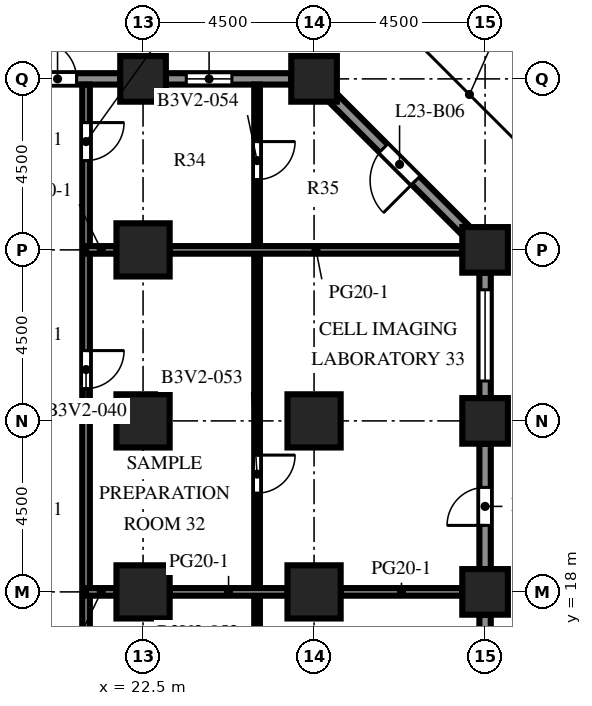
"""IFC4 building model, lengths in metres.
Left out: names, types, materials, properties, quantities, classifications, styles, units other than length and angle.
Written with IfcOpenShell. Run it as: python <this file> out.ifc"""

import sys

from ifc_helpers import new_model, si_unit, direction, frame, frame_2d, origin, origin_2d, place, context, subcontext, project, spatial, rectangle, extrude, element, fill, save


model = new_model("IFC4")
c1 = context("Model", 3, precision=1e-05, world=origin(), true_north=direction((0.0, 1.0)))
c2 = subcontext(c1, "Body", "Model", "MODEL_VIEW")
j1 = project(units=[si_unit("LENGTHUNIT", "METRE"), si_unit("PLANEANGLEUNIT", "RADIAN")], contexts=[c1])
p1 = place(None, origin())
s1 = spatial("IfcSite", under=j1, at=p1, CompositionType="ELEMENT")
p2 = place(p1, origin())
s2 = spatial("IfcBuilding", under=s1, at=p2, CompositionType="ELEMENT")
p3 = place(p2, frame((0.0, 0.0, 102.5)))
s3 = spatial("IfcBuildingStorey", under=s2, at=p3, CompositionType="ELEMENT", Elevation=102.5)
for number, where, z_axis, x_axis in (
    (1, (22.5, 31.5, 0.0), (0.0, 0.0, 1.0), (1.0, 0.0, 0.0)),
    (2, (27.0, 31.5, 0.0), (0.0, 0.0, 1.0), (1.0, 0.0, 0.0)),
    (3, (31.5, 18.0, 0.0), (0.0, 0.0, 1.0), (1.0, 0.0, 0.0)),
    (4, (31.5, 22.5, 0.0), (0.0, 0.0, 1.0), (1.0, 0.0, 0.0)),
    (5, (31.5, 27.0, 0.0), (0.0, 0.0, 1.0), (1.0, 0.0, 0.0)),
):
    element("IfcColumn", number, at=place(p3, frame(where, z_axis=z_axis, x_axis=x_axis)), inside=s3, PredefinedType="COLUMN", context=c2, shape_type="SweptSolid", body=[
        extrude(rectangle(XDim=1.2, YDim=1.2, at=origin_2d()), origin(), (0.0, 0.0, 1.0), 4.1),
    ])
for number, where, z_axis, x_axis in (
    (6, (22.5, 18.0, 0.0), (0.0, 0.0, 1.0), (1.0, 0.0, 0.0)),
    (7, (22.5, 22.5, 0.0), (0.0, 0.0, 1.0), (1.0, 0.0, 0.0)),
    (8, (22.5, 27.0, 0.0), (0.0, 0.0, 1.0), (1.0, 0.0, 0.0)),
    (9, (27.0, 18.0, 0.0), (0.0, 0.0, 1.0), (1.0, 0.0, 0.0)),
    (10, (27.0, 22.5, 0.0), (0.0, 0.0, 1.0), (1.0, 0.0, 0.0)),
):
    element("IfcColumn", number, at=place(p3, frame(where, z_axis=z_axis, x_axis=x_axis)), inside=s3, PredefinedType="COLUMN", context=c2, shape_type="SweptSolid", body=[
        extrude(rectangle(XDim=1.4, YDim=1.4, at=origin_2d()), origin(), (0.0, 0.0, 1.0), 4.1),
    ])
p4 = place(p3, frame((31.5, 17.4, 0.0), z_axis=(0.0, 0.0, 1.0), x_axis=(0.0, -1.0, 0.0)))
e11 = element("IfcWall", 11, at=p4, inside=s3, PredefinedType="SOLIDWALL", context=c2, shape_type="SweptSolid", body=[
    extrude(rectangle(XDim=3.3, YDim=0.3, at=frame_2d((1.65, 0.0))), origin(), (0.0, 0.0, 1.0), 2.75),
])
p5 = place(p4, frame((0.45, 0.0, 0.8)))
e12 = element("IfcOpeningElement", 12, at=p5, cuts=e11, PredefinedType="OPENING", context=c2, shape_type="SweptSolid", body=[
    extrude(rectangle(XDim=2.4, YDim=1.7, at=frame_2d((1.2, 0.85))), frame((0.0, 0.16, 0.0), z_axis=(0.0, -1.0, 0.0), x_axis=(1.0, 0.0, 0.0)), (0.0, 0.0, 1.0), 0.32),
])
p6 = place(p3, frame((31.5, 21.9, 0.0), z_axis=(0.0, 0.0, 1.0), x_axis=(0.0, -1.0, 0.0)))
e13 = element("IfcWall", 13, at=p6, inside=s3, PredefinedType="SOLIDWALL", context=c2, shape_type="SweptSolid", body=[
    extrude(rectangle(XDim=3.3, YDim=0.3, at=frame_2d((1.65, 0.0))), origin(), (0.0, 0.0, 1.0), 2.75),
])
p7 = place(p6, frame((1.15, 0.0, 0.0)))
e14 = element("IfcOpeningElement", 14, at=p7, cuts=e13, PredefinedType="OPENING", context=c2, shape_type="SweptSolid", body=[
    extrude(rectangle(XDim=1.0, YDim=2.2, at=frame_2d((0.5, 1.1))), frame((0.0, 0.16, 0.0), z_axis=(0.0, -1.0, 0.0), x_axis=(1.0, 0.0, 0.0)), (0.0, 0.0, 1.0), 0.32),
])
p8 = place(p3, frame((31.5, 26.4, 0.0), z_axis=(0.0, 0.0, 1.0), x_axis=(0.0, -1.0, 0.0)))
e15 = element("IfcWall", 15, at=p8, inside=s3, PredefinedType="SOLIDWALL", context=c2, shape_type="SweptSolid", body=[
    extrude(rectangle(XDim=3.3, YDim=0.3, at=frame_2d((1.65, 0.0))), origin(), (0.0, 0.0, 1.0), 2.75),
])
p9 = place(p8, frame((0.45, 0.0, 0.8)))
e16 = element("IfcOpeningElement", 16, at=p9, cuts=e15, PredefinedType="OPENING", context=c2, shape_type="SweptSolid", body=[
    extrude(rectangle(XDim=2.4, YDim=1.7, at=frame_2d((1.2, 0.85))), frame((0.0, 0.16, 0.0), z_axis=(0.0, -1.0, 0.0), x_axis=(1.0, 0.0, 0.0)), (0.0, 0.0, 1.0), 0.32),
])
p10 = place(p3, frame((27.494, 31.006, 0.0), z_axis=(0.0, 0.0, 1.0), x_axis=(0.707106781187, -0.707106781187, 0.0)))
e17 = element("IfcWall", 17, at=p10, inside=s3, PredefinedType="SOLIDWALL", context=c2, shape_type="SweptSolid", body=[
    extrude(rectangle(XDim=4.967, YDim=0.3, at=frame_2d((2.483, 0.0))), origin(), (0.0, 0.0, 1.0), 2.75),
])
p11 = place(p10, frame((1.884, 0.0, 0.0)))
e18 = element("IfcOpeningElement", 18, at=p11, cuts=e17, PredefinedType="OPENING", context=c2, shape_type="SweptSolid", body=[
    extrude(rectangle(XDim=1.2, YDim=2.2, at=frame_2d((0.6, 1.1))), frame((0.0, 0.16, 0.0), z_axis=(0.0, -1.0, 0.0), x_axis=(1.0, 0.0, 0.0)), (0.0, 0.0, 1.0), 0.32),
])
p12 = place(p3, frame((23.1, 31.5, 0.0), z_axis=(0.0, 0.0, 1.0), x_axis=(1.0, 0.0, 0.0)))
e19 = element("IfcWall", 19, at=p12, inside=s3, PredefinedType="SOLIDWALL", context=c2, shape_type="SweptSolid", body=[
    extrude(rectangle(XDim=3.3, YDim=0.3, at=frame_2d((1.65, 0.0))), origin(), (0.0, 0.0, 1.0), 2.75),
])
p13 = place(p12, frame((0.538, 0.0, 0.8)))
e20 = element("IfcOpeningElement", 20, at=p13, cuts=e19, PredefinedType="OPENING", context=c2, shape_type="SweptSolid", body=[
    extrude(rectangle(XDim=1.2, YDim=1.7, at=frame_2d((0.6, 0.85))), frame((0.0, 0.16, 0.0), z_axis=(0.0, -1.0, 0.0), x_axis=(1.0, 0.0, 0.0)), (0.0, 0.0, 1.0), 0.32),
])
p14 = place(p3, frame((18.6, 31.5, 0.0), z_axis=(0.0, 0.0, 1.0), x_axis=(1.0, 0.0, 0.0)))
e21 = element("IfcWall", 21, at=p14, inside=s3, PredefinedType="SOLIDWALL", context=c2, shape_type="SweptSolid", body=[
    extrude(rectangle(XDim=3.3, YDim=0.3, at=frame_2d((1.65, 0.0))), origin(), (0.0, 0.0, 1.0), 2.75),
])
p15 = place(p14, frame((1.15, 0.0, 0.0)))
e22 = element("IfcOpeningElement", 22, at=p15, cuts=e21, PredefinedType="OPENING", context=c2, shape_type="SweptSolid", body=[
    extrude(rectangle(XDim=1.0, YDim=2.2, at=frame_2d((0.5, 1.1))), frame((0.0, 0.16, 0.0), z_axis=(0.0, -1.0, 0.0), x_axis=(1.0, 0.0, 0.0)), (0.0, 0.0, 1.0), 0.32),
])
p16 = place(p3, frame((21.0, 31.35, 0.0), z_axis=(0.0, 0.0, 1.0), x_axis=(0.0, -1.0, 0.0)))
e23 = element("IfcWall", 23, at=p16, inside=s3, PredefinedType="PARTITIONING", context=c2, shape_type="SweptSolid", body=[
    extrude(rectangle(XDim=53.7, YDim=0.2, at=frame_2d((26.85, 0.0))), origin(), (0.0, 0.0, 1.0), 3.65),
])
p17 = place(p16, frame((50.5, 0.0, 0.0)))
e24 = element("IfcOpeningElement", 24, at=p17, cuts=e23, PredefinedType="OPENING", context=c2, shape_type="SweptSolid", body=[
    extrude(rectangle(XDim=1.0, YDim=2.1, at=frame_2d((0.5, 1.05))), frame((0.0, 0.11, 0.0), z_axis=(0.0, -1.0, 0.0), x_axis=(1.0, 0.0, 0.0)), (0.0, 0.0, 1.0), 0.22),
])
p18 = place(p16, frame((46.5, 0.0, 0.0)))
e25 = element("IfcOpeningElement", 25, at=p18, cuts=e23, PredefinedType="OPENING", context=c2, shape_type="SweptSolid", body=[
    extrude(rectangle(XDim=1.0, YDim=2.1, at=frame_2d((0.5, 1.05))), frame((0.0, 0.11, 0.0), z_axis=(0.0, -1.0, 0.0), x_axis=(1.0, 0.0, 0.0)), (0.0, 0.0, 1.0), 0.22),
])
p19 = place(p16, frame((38.5, 0.0, 0.0)))
e26 = element("IfcOpeningElement", 26, at=p19, cuts=e23, PredefinedType="OPENING", context=c2, shape_type="SweptSolid", body=[
    extrude(rectangle(XDim=1.0, YDim=2.1, at=frame_2d((0.5, 1.05))), frame((0.0, 0.11, 0.0), z_axis=(0.0, -1.0, 0.0), x_axis=(1.0, 0.0, 0.0)), (0.0, 0.0, 1.0), 0.22),
])
p20 = place(p16, frame((33.0, 0.0, 0.0)))
e27 = element("IfcOpeningElement", 27, at=p20, cuts=e23, PredefinedType="OPENING", context=c2, shape_type="SweptSolid", body=[
    extrude(rectangle(XDim=1.0, YDim=2.1, at=frame_2d((0.5, 1.05))), frame((0.0, 0.11, 0.0), z_axis=(0.0, -1.0, 0.0), x_axis=(1.0, 0.0, 0.0)), (0.0, 0.0, 1.0), 0.22),
])
p21 = place(p16, frame((23.5, 0.0, 0.0)))
e28 = element("IfcOpeningElement", 28, at=p21, cuts=e23, PredefinedType="OPENING", context=c2, shape_type="SweptSolid", body=[
    extrude(rectangle(XDim=1.0, YDim=2.1, at=frame_2d((0.5, 1.05))), frame((0.0, 0.11, 0.0), z_axis=(0.0, -1.0, 0.0), x_axis=(1.0, 0.0, 0.0)), (0.0, 0.0, 1.0), 0.22),
])
p22 = place(p16, frame((15.75, 0.0, 0.0)))
e29 = element("IfcOpeningElement", 29, at=p22, cuts=e23, PredefinedType="OPENING", context=c2, shape_type="SweptSolid", body=[
    extrude(rectangle(XDim=1.0, YDim=2.1, at=frame_2d((0.5, 1.05))), frame((0.0, 0.11, 0.0), z_axis=(0.0, -1.0, 0.0), x_axis=(1.0, 0.0, 0.0)), (0.0, 0.0, 1.0), 0.22),
])
p23 = place(p16, frame((7.0, 0.0, 0.0)))
e30 = element("IfcOpeningElement", 30, at=p23, cuts=e23, PredefinedType="OPENING", context=c2, shape_type="SweptSolid", body=[
    extrude(rectangle(XDim=1.0, YDim=2.1, at=frame_2d((0.5, 1.05))), frame((0.0, 0.11, 0.0), z_axis=(0.0, -1.0, 0.0), x_axis=(1.0, 0.0, 0.0)), (0.0, 0.0, 1.0), 0.22),
])
p24 = place(p16, frame((1.0, 0.0, 0.0)))
e31 = element("IfcOpeningElement", 31, at=p24, cuts=e23, PredefinedType="OPENING", context=c2, shape_type="SweptSolid", body=[
    extrude(rectangle(XDim=1.0, YDim=2.1, at=frame_2d((0.5, 1.05))), frame((0.0, 0.11, 0.0), z_axis=(0.0, -1.0, 0.0), x_axis=(1.0, 0.0, 0.0)), (0.0, 0.0, 1.0), 0.22),
])
p25 = place(p3, frame((25.5, 31.35, 0.0), z_axis=(0.0, 0.0, 1.0), x_axis=(0.0, -1.0, 0.0)))
e32 = element("IfcWall", 32, at=p25, inside=s3, PredefinedType="PARTITIONING", context=c2, shape_type="SweptSolid", body=[
    extrude(rectangle(XDim=53.7, YDim=0.15, at=frame_2d((26.85, 0.0))), origin(), (0.0, 0.0, 1.0), 3.65),
])
p26 = place(p25, frame((50.5, 0.0, 0.0)))
e33 = element("IfcOpeningElement", 33, at=p26, cuts=e32, PredefinedType="OPENING", context=c2, shape_type="SweptSolid", body=[
    extrude(rectangle(XDim=1.0, YDim=2.1, at=frame_2d((0.5, 1.05))), frame((0.0, 0.085, 0.0), z_axis=(0.0, -1.0, 0.0), x_axis=(1.0, 0.0, 0.0)), (0.0, 0.0, 1.0), 0.17),
])
p27 = place(p25, frame((46.25, 0.0, 0.0)))
e34 = element("IfcOpeningElement", 34, at=p27, cuts=e32, PredefinedType="OPENING", context=c2, shape_type="SweptSolid", body=[
    extrude(rectangle(XDim=1.0, YDim=2.1, at=frame_2d((0.5, 1.05))), frame((0.0, 0.085, 0.0), z_axis=(0.0, -1.0, 0.0), x_axis=(1.0, 0.0, 0.0)), (0.0, 0.0, 1.0), 0.17),
])
p28 = place(p25, frame((38.5, 0.0, 0.0)))
e35 = element("IfcOpeningElement", 35, at=p28, cuts=e32, PredefinedType="OPENING", context=c2, shape_type="SweptSolid", body=[
    extrude(rectangle(XDim=1.0, YDim=2.1, at=frame_2d((0.5, 1.05))), frame((0.0, 0.085, 0.0), z_axis=(0.0, -1.0, 0.0), x_axis=(1.0, 0.0, 0.0)), (0.0, 0.0, 1.0), 0.17),
])
p29 = place(p25, frame((33.0, 0.0, 0.0)))
e36 = element("IfcOpeningElement", 36, at=p29, cuts=e32, PredefinedType="OPENING", context=c2, shape_type="SweptSolid", body=[
    extrude(rectangle(XDim=1.0, YDim=2.1, at=frame_2d((0.5, 1.05))), frame((0.0, 0.085, 0.0), z_axis=(0.0, -1.0, 0.0), x_axis=(1.0, 0.0, 0.0)), (0.0, 0.0, 1.0), 0.17),
])
p30 = place(p25, frame((24.75, 0.0, 0.0)))
e37 = element("IfcOpeningElement", 37, at=p30, cuts=e32, PredefinedType="OPENING", context=c2, shape_type="SweptSolid", body=[
    extrude(rectangle(XDim=1.0, YDim=2.1, at=frame_2d((0.5, 1.05))), frame((0.0, 0.085, 0.0), z_axis=(0.0, -1.0, 0.0), x_axis=(1.0, 0.0, 0.0)), (0.0, 0.0, 1.0), 0.17),
])
p31 = place(p25, frame((15.5, 0.0, 0.0)))
e38 = element("IfcOpeningElement", 38, at=p31, cuts=e32, PredefinedType="OPENING", context=c2, shape_type="SweptSolid", body=[
    extrude(rectangle(XDim=1.0, YDim=2.1, at=frame_2d((0.5, 1.05))), frame((0.0, 0.085, 0.0), z_axis=(0.0, -1.0, 0.0), x_axis=(1.0, 0.0, 0.0)), (0.0, 0.0, 1.0), 0.17),
])
p32 = place(p25, frame((9.75, 0.0, 0.0)))
e39 = element("IfcOpeningElement", 39, at=p32, cuts=e32, PredefinedType="OPENING", context=c2, shape_type="SweptSolid", body=[
    extrude(rectangle(XDim=1.0, YDim=2.1, at=frame_2d((0.5, 1.05))), frame((0.0, 0.085, 0.0), z_axis=(0.0, -1.0, 0.0), x_axis=(1.0, 0.0, 0.0)), (0.0, 0.0, 1.0), 0.17),
])
p33 = place(p25, frame((1.5, 0.0, 0.0)))
e40 = element("IfcOpeningElement", 40, at=p33, cuts=e32, PredefinedType="OPENING", context=c2, shape_type="SweptSolid", body=[
    extrude(rectangle(XDim=1.0, YDim=2.1, at=frame_2d((0.5, 1.05))), frame((0.0, 0.085, 0.0), z_axis=(0.0, -1.0, 0.0), x_axis=(1.0, 0.0, 0.0)), (0.0, 0.0, 1.0), 0.17),
])
p34 = place(p3, frame((21.0, 18.0, 0.0), z_axis=(0.0, 0.0, 1.0), x_axis=(1.0, 0.0, 0.0)))
e41 = element("IfcWall", 41, at=p34, inside=s3, PredefinedType="PARTITIONING", context=c2, shape_type="SweptSolid", body=[
    extrude(rectangle(XDim=0.8, YDim=0.2, at=frame_2d((0.4, 0.0))), origin(), (0.0, 0.0, 1.0), 3.65),
])
p35 = place(p3, frame((23.2, 18.0, 0.0), z_axis=(0.0, 0.0, 1.0), x_axis=(1.0, 0.0, 0.0)))
e42 = element("IfcWall", 42, at=p35, inside=s3, PredefinedType="PARTITIONING", context=c2, shape_type="SweptSolid", body=[
    extrude(rectangle(XDim=3.1, YDim=0.2, at=frame_2d((1.55, 0.0))), origin(), (0.0, 0.0, 1.0), 3.65),
])
p36 = place(p3, frame((27.7, 18.0, 0.0), z_axis=(0.0, 0.0, 1.0), x_axis=(1.0, 0.0, 0.0)))
e43 = element("IfcWall", 43, at=p36, inside=s3, PredefinedType="PARTITIONING", context=c2, shape_type="SweptSolid", body=[
    extrude(rectangle(XDim=3.2, YDim=0.2, at=frame_2d((1.6, 0.0))), origin(), (0.0, 0.0, 1.0), 3.65),
])
p37 = place(p3, frame((21.0, 27.0, 0.0), z_axis=(0.0, 0.0, 1.0), x_axis=(1.0, 0.0, 0.0)))
e44 = element("IfcWall", 44, at=p37, inside=s3, PredefinedType="PARTITIONING", context=c2, shape_type="SweptSolid", body=[
    extrude(rectangle(XDim=0.8, YDim=0.2, at=frame_2d((0.4, 0.0))), origin(), (0.0, 0.0, 1.0), 3.65),
])
p38 = place(p3, frame((23.2, 27.0, 0.0), z_axis=(0.0, 0.0, 1.0), x_axis=(1.0, 0.0, 0.0)))
e45 = element("IfcWall", 45, at=p38, inside=s3, PredefinedType="PARTITIONING", context=c2, shape_type="SweptSolid", body=[
    extrude(rectangle(XDim=7.7, YDim=0.2, at=frame_2d((3.85, 0.0))), origin(), (0.0, 0.0, 1.0), 3.65),
])
p39 = place(p7, origin())
e46 = element("IfcDoor", 46, at=p39, inside=s3, OperationType="SINGLE_SWING_RIGHT", PredefinedType="DOOR", context=c2, shape_type="SweptSolid", body=[
    extrude(rectangle(XDim=1.0, YDim=2.2, at=frame_2d((0.5, 1.1))), frame((0.0, 0.025, 0.0), z_axis=(0.0, -1.0, 0.0), x_axis=(1.0, 0.0, 0.0)), (0.0, 0.0, 1.0), 0.05),
])
fill(e14, e46)
p40 = place(p9, origin())
e47 = element("IfcWindow", 47, at=p40, inside=s3, PartitioningType="SINGLE_PANEL", PredefinedType="WINDOW", context=c2, shape_type="SweptSolid", body=[
    extrude(rectangle(XDim=2.4, YDim=1.7, at=frame_2d((1.2, 0.85))), frame((0.0, 0.03, 0.0), z_axis=(0.0, -1.0, 0.0), x_axis=(1.0, 0.0, 0.0)), (0.0, 0.0, 1.0), 0.06),
])
fill(e16, e47)
p41 = place(p11, origin())
e48 = element("IfcDoor", 48, at=p41, inside=s3, OperationType="SINGLE_SWING_RIGHT", PredefinedType="DOOR", context=c2, shape_type="SweptSolid", body=[
    extrude(rectangle(XDim=1.2, YDim=2.2, at=frame_2d((0.6, 1.1))), frame((0.0, 0.025, 0.0), z_axis=(0.0, -1.0, 0.0), x_axis=(1.0, 0.0, 0.0)), (0.0, 0.0, 1.0), 0.05),
])
fill(e18, e48)
p42 = place(p13, origin())
e49 = element("IfcWindow", 49, at=p42, inside=s3, PartitioningType="SINGLE_PANEL", PredefinedType="WINDOW", context=c2, shape_type="SweptSolid", body=[
    extrude(rectangle(XDim=1.2, YDim=1.7, at=frame_2d((0.6, 0.85))), frame((0.0, 0.03, 0.0), z_axis=(0.0, -1.0, 0.0), x_axis=(1.0, 0.0, 0.0)), (0.0, 0.0, 1.0), 0.06),
])
fill(e20, e49)
p43 = place(p15, origin())
e50 = element("IfcDoor", 50, at=p43, inside=s3, OperationType="SINGLE_SWING_LEFT", PredefinedType="DOOR", context=c2, shape_type="SweptSolid", body=[
    extrude(rectangle(XDim=1.0, YDim=2.2, at=frame_2d((0.5, 1.1))), frame((0.0, 0.025, 0.0), z_axis=(0.0, -1.0, 0.0), x_axis=(1.0, 0.0, 0.0)), (0.0, 0.0, 1.0), 0.05),
])
fill(e22, e50)
p44 = place(p23, origin())
e51 = element("IfcDoor", 51, at=p44, inside=s3, OperationType="SINGLE_SWING_LEFT", PredefinedType="DOOR", context=c2, shape_type="SweptSolid", body=[
    extrude(rectangle(XDim=1.0, YDim=2.1, at=frame_2d((0.5, 1.05))), frame((0.0, 0.025, 0.0), z_axis=(0.0, -1.0, 0.0), x_axis=(1.0, 0.0, 0.0)), (0.0, 0.0, 1.0), 0.05),
])
fill(e30, e51)
p45 = place(p24, origin())
e52 = element("IfcDoor", 52, at=p45, inside=s3, OperationType="SINGLE_SWING_LEFT", PredefinedType="DOOR", context=c2, shape_type="SweptSolid", body=[
    extrude(rectangle(XDim=1.0, YDim=2.1, at=frame_2d((0.5, 1.05))), frame((0.0, 0.025, 0.0), z_axis=(0.0, -1.0, 0.0), x_axis=(1.0, 0.0, 0.0)), (0.0, 0.0, 1.0), 0.05),
])
fill(e31, e52)
p46 = place(p32, origin())
e53 = element("IfcDoor", 53, at=p46, inside=s3, OperationType="SINGLE_SWING_LEFT", PredefinedType="DOOR", context=c2, shape_type="SweptSolid", body=[
    extrude(rectangle(XDim=1.0, YDim=2.1, at=frame_2d((0.5, 1.05))), frame((0.0, 0.025, 0.0), z_axis=(0.0, -1.0, 0.0), x_axis=(1.0, 0.0, 0.0)), (0.0, 0.0, 1.0), 0.05),
])
fill(e39, e53)
p47 = place(p33, origin())
e54 = element("IfcDoor", 54, at=p47, inside=s3, OperationType="SINGLE_SWING_LEFT", PredefinedType="DOOR", context=c2, shape_type="SweptSolid", body=[
    extrude(rectangle(XDim=1.0, YDim=2.1, at=frame_2d((0.5, 1.05))), frame((0.0, 0.025, 0.0), z_axis=(0.0, -1.0, 0.0), x_axis=(1.0, 0.0, 0.0)), (0.0, 0.0, 1.0), 0.05),
])
fill(e40, e54)
save(model, sys.argv[1])
